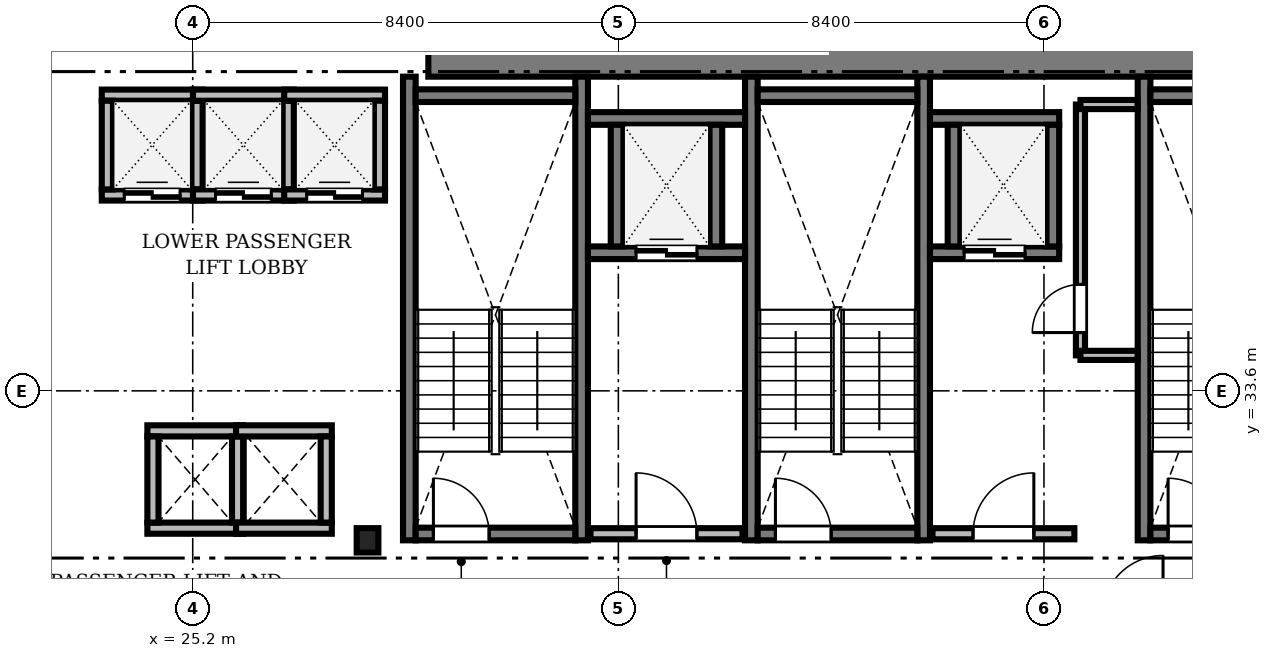
"""IFC4 building model, lengths in metres.
Left out: names, types, materials, properties, quantities, classifications, styles, units other than length and angle.
Written with IfcOpenShell. Run it as: python <this file> out.ifc"""

import sys

from ifc_helpers import new_model, si_unit, direction, frame, frame_2d, origin, origin_2d, place, context, subcontext, project, spatial, rectangle, i_section, extrude, source, transform, mapped, element, fill, save


model = new_model("IFC4")
c1 = context("Model", 3, precision=1e-05, world=origin(), true_north=direction((0.0, 1.0)))
c2 = subcontext(c1, "Body", "Model", "MODEL_VIEW")
j1 = project(units=[si_unit("LENGTHUNIT", "METRE"), si_unit("PLANEANGLEUNIT", "RADIAN")], contexts=[c1])
p1 = place(None, origin())
s1 = spatial("IfcSite", under=j1, at=p1, CompositionType="ELEMENT")
p2 = place(p1, origin())
s2 = spatial("IfcBuilding", under=s1, at=p2, CompositionType="ELEMENT")
p3 = place(p2, frame((0.0, 0.0, 53.15)))
s3 = spatial("IfcBuildingStorey", under=s2, at=p3, CompositionType="ELEMENT", Elevation=53.15)
m1 = source(origin(), c2, "Body", "SweptSolid", [
    extrude(rectangle(XDim=17.52, YDim=1.0, at=frame_2d((8.76, 0.0))), origin(), (0.0, 0.0, 1.0), 3.41),
])
p4 = place(p3, frame((29.85, 40.3, 0.0), z_axis=(0.0, 0.0, 1.0), x_axis=(1.0, 0.0, 0.0)))
e1 = element("IfcWall", 1, at=p4, inside=s3, PredefinedType="SHEAR", context=c2, shape_type="MappedRepresentation", body=[
    mapped(m1, transform((0.0, 0.0, 0.0), scale=1.0)),
])
m2 = source(origin(), c2, "Body", "SweptSolid", [
    extrude(i_section(OverallWidth=0.428, OverallDepth=0.481, WebThickness=0.04, FlangeThickness=0.063, FilletRadius=0.015, at=origin_2d()), origin(), (0.0, 0.0, 1.0), 3.41),
])
p5 = place(p3, frame((28.65, 30.65, 0.0), z_axis=(0.0, 0.0, 1.0), x_axis=(1.0, 0.0, 0.0)))
e2 = element("IfcColumn", 2, at=p5, inside=s3, PredefinedType="COLUMN", context=c2, shape_type="MappedRepresentation", body=[
    mapped(m2, transform((0.0, 0.0, 0.0), scale=1.0)),
])
m3 = source(origin(), c2, "Body", "SweptSolid", [
    extrude(rectangle(XDim=9.15, YDim=0.25, at=frame_2d((4.575, 0.0))), origin(), (0.0, 0.0, 1.0), 3.45),
])
for number, where, z_axis, x_axis in (
    (3, (29.475, 30.65, 0.0), (0.0, 0.0, 1.0), (0.0, 1.0, 0.0)),
    (4, (32.875, 30.65, 0.0), (0.0, 0.0, 1.0), (0.0, 1.0, 0.0)),
):
    element("IfcWall", number, at=place(p3, frame(where, z_axis=z_axis, x_axis=x_axis)), inside=s3, PredefinedType="SOLIDWALL", context=c2, shape_type="MappedRepresentation", body=[
        mapped(m3, transform((0.0, 0.0, 0.0), scale=1.0)),
    ])
m4 = source(origin(), c2, "Body", "SweptSolid", [
    extrude(rectangle(XDim=3.15, YDim=0.25, at=frame_2d((1.575, 0.0))), origin(), (0.0, 0.0, 1.0), 3.45),
])
p6 = place(p3, frame((29.6, 39.425, 0.0), z_axis=(0.0, 0.0, 1.0), x_axis=(1.0, 0.0, 0.0)))
e5 = element("IfcWall", 5, at=p6, inside=s3, PredefinedType="SOLIDWALL", context=c2, shape_type="MappedRepresentation", body=[
    mapped(m4, transform((0.0, 0.0, 0.0), scale=1.0)),
])
p7 = place(p3, frame((29.6, 30.775, 0.0), z_axis=(0.0, 0.0, 1.0), x_axis=(1.0, 0.0, 0.0)))
e6 = element("IfcWall", 6, at=p7, inside=s3, PredefinedType="SOLIDWALL", context=c2, shape_type="MappedRepresentation", body=[
    mapped(m4, transform((0.0, 0.0, 0.0), scale=1.0)),
])
m5 = source(origin(), c2, "Body", "SweptSolid", [
    extrude(rectangle(XDim=1.1, YDim=2.2, at=frame_2d((0.55, 1.1))), frame((0.0, 0.135, 0.0), z_axis=(0.0, -1.0, 0.0), x_axis=(1.0, 0.0, 0.0)), (0.0, 0.0, 1.0), 0.27),
])
p8 = place(p7, frame((0.35, 0.0, 0.0)))
e7 = element("IfcOpeningElement", 7, at=p8, cuts=e6, PredefinedType="OPENING", context=c2, shape_type="MappedRepresentation", body=[
    mapped(m5, transform((0.0, 0.0, 0.0), scale=1.0)),
])
for number, where, z_axis, x_axis in (
    (8, (36.225, 30.65, 0.0), (0.0, 0.0, 1.0), (0.0, 1.0, 0.0)),
    (9, (39.625, 30.65, 0.0), (0.0, 0.0, 1.0), (0.0, 1.0, 0.0)),
):
    element("IfcWall", number, at=place(p3, frame(where, z_axis=z_axis, x_axis=x_axis)), inside=s3, PredefinedType="SOLIDWALL", context=c2, shape_type="MappedRepresentation", body=[
        mapped(m3, transform((0.0, 0.0, 0.0), scale=1.0)),
    ])
p9 = place(p3, frame((36.35, 39.425, 0.0), z_axis=(0.0, 0.0, 1.0), x_axis=(1.0, 0.0, 0.0)))
e10 = element("IfcWall", 10, at=p9, inside=s3, PredefinedType="SOLIDWALL", context=c2, shape_type="MappedRepresentation", body=[
    mapped(m4, transform((0.0, 0.0, 0.0), scale=1.0)),
])
p10 = place(p3, frame((36.35, 30.775, 0.0), z_axis=(0.0, 0.0, 1.0), x_axis=(1.0, 0.0, 0.0)))
e11 = element("IfcWall", 11, at=p10, inside=s3, PredefinedType="SOLIDWALL", context=c2, shape_type="MappedRepresentation", body=[
    mapped(m4, transform((0.0, 0.0, 0.0), scale=1.0)),
])
p11 = place(p10, frame((0.35, 0.0, 0.0)))
e12 = element("IfcOpeningElement", 12, at=p11, cuts=e11, PredefinedType="OPENING", context=c2, shape_type="MappedRepresentation", body=[
    mapped(m5, transform((0.0, 0.0, 0.0), scale=1.0)),
])
p12 = place(p3, frame((43.975, 30.65, 0.0), z_axis=(0.0, 0.0, 1.0), x_axis=(0.0, 1.0, 0.0)))
e13 = element("IfcWall", 13, at=p12, inside=s3, PredefinedType="SOLIDWALL", context=c2, shape_type="MappedRepresentation", body=[
    mapped(m3, transform((0.0, 0.0, 0.0), scale=1.0)),
])
p13 = place(p3, frame((44.1, 39.425, 0.0), z_axis=(0.0, 0.0, 1.0), x_axis=(1.0, 0.0, 0.0)))
e14 = element("IfcWall", 14, at=p13, inside=s3, PredefinedType="SOLIDWALL", context=c2, shape_type="MappedRepresentation", body=[
    mapped(m4, transform((0.0, 0.0, 0.0), scale=1.0)),
])
p14 = place(p3, frame((44.1, 30.775, 0.0), z_axis=(0.0, 0.0, 1.0), x_axis=(1.0, 0.0, 0.0)))
e15 = element("IfcWall", 15, at=p14, inside=s3, PredefinedType="SOLIDWALL", context=c2, shape_type="MappedRepresentation", body=[
    mapped(m4, transform((0.0, 0.0, 0.0), scale=1.0)),
])
p15 = place(p14, frame((0.35, 0.0, 0.0)))
e16 = element("IfcOpeningElement", 16, at=p15, cuts=e15, PredefinedType="OPENING", context=c2, shape_type="MappedRepresentation", body=[
    mapped(m5, transform((0.0, 0.0, 0.0), scale=1.0)),
])
m6 = source(origin(), c2, "Body", "SweptSolid", [
    extrude(rectangle(XDim=3.0, YDim=0.22, at=frame_2d((1.5, 0.0))), origin(), (0.0, 0.0, 1.0), 3.41),
])
p16 = place(p3, frame((33.05, 30.78, 0.0), z_axis=(0.0, 0.0, 1.0), x_axis=(1.0, 0.0, 0.0)))
e17 = element("IfcWall", 17, at=p16, inside=s3, PredefinedType="SOLIDWALL", context=c2, shape_type="MappedRepresentation", body=[
    mapped(m6, transform((0.0, 0.0, 0.0), scale=1.0)),
])
m7 = source(origin(), c2, "Body", "SweptSolid", [
    extrude(rectangle(XDim=1.2, YDim=2.2, at=frame_2d((0.6, 1.1))), frame((0.0, 0.12, 0.0), z_axis=(0.0, -1.0, 0.0), x_axis=(1.0, 0.0, 0.0)), (0.0, 0.0, 1.0), 0.24),
])
p17 = place(p16, frame((0.9, 0.0, 0.0)))
e18 = element("IfcOpeningElement", 18, at=p17, cuts=e17, PredefinedType="OPENING", context=c2, shape_type="MappedRepresentation", body=[
    mapped(m7, transform((0.0, 0.0, 0.0), scale=1.0)),
])
m8 = source(origin(), c2, "Body", "SweptSolid", [
    extrude(rectangle(XDim=2.8, YDim=0.22, at=frame_2d((1.4, 0.0))), origin(), (0.0, 0.0, 1.0), 3.41),
])
p18 = place(p3, frame((39.8, 30.78, 0.0), z_axis=(0.0, 0.0, 1.0), x_axis=(1.0, 0.0, 0.0)))
e19 = element("IfcWall", 19, at=p18, inside=s3, PredefinedType="SOLIDWALL", context=c2, shape_type="MappedRepresentation", body=[
    mapped(m8, transform((0.0, 0.0, 0.0), scale=1.0)),
])
p19 = place(p18, frame((0.8, 0.0, 0.0)))
e20 = element("IfcOpeningElement", 20, at=p19, cuts=e19, PredefinedType="OPENING", context=c2, shape_type="MappedRepresentation", body=[
    mapped(m7, transform((0.0, 0.0, 0.0), scale=1.0)),
])
m9 = source(origin(), c2, "Body", "SweptSolid", [
    extrude(rectangle(XDim=1.99, YDim=0.22, at=frame_2d((0.995, 0.0))), origin(), (0.0, 0.0, 1.0), 3.41),
])
p20 = place(p3, frame((23.405, 37.465, 0.0), z_axis=(0.0, 0.0, 1.0), x_axis=(1.0, 0.0, 0.0)))
e21 = element("IfcWall", 21, at=p20, inside=s3, PredefinedType="SOLIDWALL", context=c2, shape_type="MappedRepresentation", body=[
    mapped(m9, transform((0.0, 0.0, 0.0), scale=1.0)),
])
m10 = source(origin(), c2, "Body", "SweptSolid", [
    extrude(rectangle(XDim=1.1, YDim=2.2, at=frame_2d((0.55, 1.1))), frame((0.0, 0.12, 0.0), z_axis=(0.0, -1.0, 0.0), x_axis=(1.0, 0.0, 0.0)), (0.0, 0.0, 1.0), 0.24),
])
p21 = place(p20, frame((0.445, 0.0, 0.0)))
e22 = element("IfcOpeningElement", 22, at=p21, cuts=e21, PredefinedType="OPENING", context=c2, shape_type="MappedRepresentation", body=[
    mapped(m10, transform((0.0, 0.0, 0.0), scale=1.0)),
])
p22 = place(p3, frame((23.405, 39.435, 0.0), z_axis=(0.0, 0.0, 1.0), x_axis=(1.0, 0.0, 0.0)))
e23 = element("IfcWall", 23, at=p22, inside=s3, PredefinedType="SOLIDWALL", context=c2, shape_type="MappedRepresentation", body=[
    mapped(m9, transform((0.0, 0.0, 0.0), scale=1.0)),
])
m11 = source(origin(), c2, "Body", "SweptSolid", [
    extrude(rectangle(XDim=1.75, YDim=0.22, at=frame_2d((0.875, 0.0))), origin(), (0.0, 0.0, 1.0), 3.41),
])
for number, where, z_axis, x_axis in (
    (24, (23.515, 37.575, 0.0), (0.0, 0.0, 1.0), (0.0, 1.0, 0.0)),
    (25, (25.285, 37.575, 0.0), (0.0, 0.0, 1.0), (0.0, 1.0, 0.0)),
):
    element("IfcWall", number, at=place(p3, frame(where, z_axis=z_axis, x_axis=x_axis)), inside=s3, PredefinedType="SOLIDWALL", context=c2, shape_type="MappedRepresentation", body=[
        mapped(m11, transform((0.0, 0.0, 0.0), scale=1.0)),
    ])
p23 = place(p3, frame((25.205, 37.465, 0.0), z_axis=(0.0, 0.0, 1.0), x_axis=(1.0, 0.0, 0.0)))
e26 = element("IfcWall", 26, at=p23, inside=s3, PredefinedType="SOLIDWALL", context=c2, shape_type="MappedRepresentation", body=[
    mapped(m9, transform((0.0, 0.0, 0.0), scale=1.0)),
])
p24 = place(p23, frame((0.445, 0.0, 0.0)))
e27 = element("IfcOpeningElement", 27, at=p24, cuts=e26, PredefinedType="OPENING", context=c2, shape_type="MappedRepresentation", body=[
    mapped(m10, transform((0.0, 0.0, 0.0), scale=1.0)),
])
p25 = place(p3, frame((25.205, 39.435, 0.0), z_axis=(0.0, 0.0, 1.0), x_axis=(1.0, 0.0, 0.0)))
e28 = element("IfcWall", 28, at=p25, inside=s3, PredefinedType="SOLIDWALL", context=c2, shape_type="MappedRepresentation", body=[
    mapped(m9, transform((0.0, 0.0, 0.0), scale=1.0)),
])
p26 = place(p3, frame((27.085, 37.575, 0.0), z_axis=(0.0, 0.0, 1.0), x_axis=(0.0, 1.0, 0.0)))
e29 = element("IfcWall", 29, at=p26, inside=s3, PredefinedType="SOLIDWALL", context=c2, shape_type="MappedRepresentation", body=[
    mapped(m11, transform((0.0, 0.0, 0.0), scale=1.0)),
])
m12 = source(origin(), c2, "Body", "SweptSolid", [
    extrude(rectangle(XDim=1.99, YDim=0.22, at=frame_2d((0.995, 0.0))), origin(), (0.0, 0.0, 1.0), 3.41),
])
p27 = place(p3, frame((27.005, 37.465, 0.0), z_axis=(0.0, 0.0, 1.0), x_axis=(1.0, 0.0, 0.0)))
e30 = element("IfcWall", 30, at=p27, inside=s3, PredefinedType="SOLIDWALL", context=c2, shape_type="MappedRepresentation", body=[
    mapped(m12, transform((0.0, 0.0, 0.0), scale=1.0)),
])
p28 = place(p27, frame((0.445, 0.0, 0.0)))
e31 = element("IfcOpeningElement", 31, at=p28, cuts=e30, PredefinedType="OPENING", context=c2, shape_type="MappedRepresentation", body=[
    mapped(m10, transform((0.0, 0.0, 0.0), scale=1.0)),
])
p29 = place(p3, frame((27.005, 39.435, 0.0), z_axis=(0.0, 0.0, 1.0), x_axis=(1.0, 0.0, 0.0)))
e32 = element("IfcWall", 32, at=p29, inside=s3, PredefinedType="SOLIDWALL", context=c2, shape_type="MappedRepresentation", body=[
    mapped(m12, transform((0.0, 0.0, 0.0), scale=1.0)),
])
p30 = place(p3, frame((28.885, 37.575, 0.0), z_axis=(0.0, 0.0, 1.0), x_axis=(0.0, 1.0, 0.0)))
e33 = element("IfcWall", 33, at=p30, inside=s3, PredefinedType="SOLIDWALL", context=c2, shape_type="MappedRepresentation", body=[
    mapped(m11, transform((0.0, 0.0, 0.0), scale=1.0)),
])
m13 = source(origin(), c2, "Body", "SweptSolid", [
    extrude(rectangle(XDim=3.1, YDim=0.25, at=frame_2d((1.55, 0.0))), origin(), (0.0, 0.0, 1.0), 3.41),
])
p31 = place(p3, frame((33.0, 36.325, 0.0), z_axis=(0.0, 0.0, 1.0), x_axis=(1.0, 0.0, 0.0)))
e34 = element("IfcWall", 34, at=p31, inside=s3, PredefinedType="SOLIDWALL", context=c2, shape_type="MappedRepresentation", body=[
    mapped(m13, transform((0.0, 0.0, 0.0), scale=1.0)),
])
m14 = source(origin(), c2, "Body", "SweptSolid", [
    extrude(rectangle(XDim=1.2, YDim=2.25, at=frame_2d((0.6, 1.125))), frame((0.0, 0.135, 0.0), z_axis=(0.0, -1.0, 0.0), x_axis=(1.0, 0.0, 0.0)), (0.0, 0.0, 1.0), 0.27),
])
p32 = place(p31, frame((0.95, 0.0, 0.0)))
e35 = element("IfcOpeningElement", 35, at=p32, cuts=e34, PredefinedType="OPENING", context=c2, shape_type="MappedRepresentation", body=[
    mapped(m14, transform((0.0, 0.0, 0.0), scale=1.0)),
])
p33 = place(p3, frame((33.0, 38.975, 0.0), z_axis=(0.0, 0.0, 1.0), x_axis=(1.0, 0.0, 0.0)))
e36 = element("IfcWall", 36, at=p33, inside=s3, PredefinedType="SOLIDWALL", context=c2, shape_type="MappedRepresentation", body=[
    mapped(m13, transform((0.0, 0.0, 0.0), scale=1.0)),
])
m15 = source(origin(), c2, "Body", "SweptSolid", [
    extrude(rectangle(XDim=2.4, YDim=0.25, at=frame_2d((1.2, 0.0))), origin(), (0.0, 0.0, 1.0), 3.41),
])
for number, where, z_axis, x_axis in (
    (37, (33.575, 36.45, 0.0), (0.0, 0.0, 1.0), (0.0, 1.0, 0.0)),
    (38, (35.525, 36.45, 0.0), (0.0, 0.0, 1.0), (0.0, 1.0, 0.0)),
):
    element("IfcWall", number, at=place(p3, frame(where, z_axis=z_axis, x_axis=x_axis)), inside=s3, PredefinedType="SOLIDWALL", context=c2, shape_type="MappedRepresentation", body=[
        mapped(m15, transform((0.0, 0.0, 0.0), scale=1.0)),
    ])
m16 = source(origin(), c2, "Body", "SweptSolid", [
    extrude(rectangle(XDim=2.55, YDim=0.25, at=frame_2d((1.275, 0.0))), origin(), (0.0, 0.0, 1.0), 3.41),
])
p34 = place(p3, frame((39.75, 36.325, 0.0), z_axis=(0.0, 0.0, 1.0), x_axis=(1.0, 0.0, 0.0)))
e39 = element("IfcWall", 39, at=p34, inside=s3, PredefinedType="SOLIDWALL", context=c2, shape_type="MappedRepresentation", body=[
    mapped(m16, transform((0.0, 0.0, 0.0), scale=1.0)),
])
p35 = place(p34, frame((0.675, 0.0, 0.0)))
e40 = element("IfcOpeningElement", 40, at=p35, cuts=e39, PredefinedType="OPENING", context=c2, shape_type="MappedRepresentation", body=[
    mapped(m14, transform((0.0, 0.0, 0.0), scale=1.0)),
])
p36 = place(p3, frame((39.75, 38.975, 0.0), z_axis=(0.0, 0.0, 1.0), x_axis=(1.0, 0.0, 0.0)))
e41 = element("IfcWall", 41, at=p36, inside=s3, PredefinedType="SOLIDWALL", context=c2, shape_type="MappedRepresentation", body=[
    mapped(m16, transform((0.0, 0.0, 0.0), scale=1.0)),
])
for number, where, z_axis, x_axis in (
    (42, (40.225, 36.45, 0.0), (0.0, 0.0, 1.0), (0.0, 1.0, 0.0)),
    (43, (42.175, 36.45, 0.0), (0.0, 0.0, 1.0), (0.0, 1.0, 0.0)),
):
    element("IfcWall", number, at=place(p3, frame(where, z_axis=z_axis, x_axis=x_axis)), inside=s3, PredefinedType="SOLIDWALL", context=c2, shape_type="MappedRepresentation", body=[
        mapped(m15, transform((0.0, 0.0, 0.0), scale=1.0)),
    ])
m17 = source(origin(), c2, "Body", "SweptSolid", [
    extrude(rectangle(XDim=1.89, YDim=0.22, at=frame_2d((0.945, 0.0))), origin(), (0.0, 0.0, 1.0), 3.41),
])
for number, where, z_axis, x_axis in (
    (44, (24.305, 30.89, 0.0), (0.0, 0.0, 1.0), (1.0, 0.0, 0.0)),
    (45, (24.305, 32.81, 0.0), (0.0, 0.0, 1.0), (1.0, 0.0, 0.0)),
):
    element("IfcWall", number, at=place(p3, frame(where, z_axis=z_axis, x_axis=x_axis)), inside=s3, PredefinedType="SOLIDWALL", context=c2, shape_type="MappedRepresentation", body=[
        mapped(m17, transform((0.0, 0.0, 0.0), scale=1.0)),
    ])
m18 = source(origin(), c2, "Body", "SweptSolid", [
    extrude(rectangle(XDim=1.7, YDim=0.22, at=frame_2d((0.85, 0.0))), origin(), (0.0, 0.0, 1.0), 3.41),
])
for number, where, z_axis, x_axis in (
    (46, (24.415, 31.0, 0.0), (0.0, 0.0, 1.0), (0.0, 1.0, 0.0)),
    (47, (26.085, 31.0, 0.0), (0.0, 0.0, 1.0), (0.0, 1.0, 0.0)),
):
    element("IfcWall", number, at=place(p3, frame(where, z_axis=z_axis, x_axis=x_axis)), inside=s3, PredefinedType="SOLIDWALL", context=c2, shape_type="MappedRepresentation", body=[
        mapped(m18, transform((0.0, 0.0, 0.0), scale=1.0)),
    ])
for number, where, z_axis, x_axis in (
    (48, (26.055, 30.89, 0.0), (0.0, 0.0, 1.0), (1.0, 0.0, 0.0)),
    (49, (26.055, 32.81, 0.0), (0.0, 0.0, 1.0), (1.0, 0.0, 0.0)),
):
    element("IfcWall", number, at=place(p3, frame(where, z_axis=z_axis, x_axis=x_axis)), inside=s3, PredefinedType="SOLIDWALL", context=c2, shape_type="MappedRepresentation", body=[
        mapped(m17, transform((0.0, 0.0, 0.0), scale=1.0)),
    ])
p37 = place(p3, frame((27.835, 31.0, 0.0), z_axis=(0.0, 0.0, 1.0), x_axis=(0.0, 1.0, 0.0)))
e50 = element("IfcWall", 50, at=p37, inside=s3, PredefinedType="SOLIDWALL", context=c2, shape_type="MappedRepresentation", body=[
    mapped(m18, transform((0.0, 0.0, 0.0), scale=1.0)),
])
m19 = source(origin(), c2, "Body", "SweptSolid", [
    extrude(rectangle(XDim=4.95, YDim=0.18, at=frame_2d((2.475, 0.0))), origin(), (0.0, 0.0, 1.0), 3.41),
])
p38 = place(p3, frame((42.72, 34.3, 0.0), z_axis=(0.0, 0.0, 1.0), x_axis=(0.0, 1.0, 0.0)))
e51 = element("IfcWall", 51, at=p38, inside=s3, PredefinedType="PARTITIONING", context=c2, shape_type="MappedRepresentation", body=[
    mapped(m19, transform((0.0, 0.0, 0.0), scale=1.0)),
])
m20 = source(origin(), c2, "Body", "SweptSolid", [
    extrude(rectangle(XDim=0.95, YDim=2.15, at=frame_2d((0.475, 1.075))), frame((0.0, 0.1, 0.0), z_axis=(0.0, -1.0, 0.0), x_axis=(1.0, 0.0, 0.0)), (0.0, 0.0, 1.0), 0.2),
])
p39 = place(p38, frame((0.45, 0.0, 0.0)))
e52 = element("IfcOpeningElement", 52, at=p39, cuts=e51, PredefinedType="OPENING", context=c2, shape_type="MappedRepresentation", body=[
    mapped(m20, transform((0.0, 0.0, 0.0), scale=1.0)),
])
m21 = source(origin(), c2, "Body", "SweptSolid", [
    extrude(rectangle(XDim=1.128, YDim=0.18, at=frame_2d((0.564, 0.0))), origin(), (0.0, 0.0, 1.0), 3.41),
])
for number, where, z_axis, x_axis in (
    (53, (42.72, 34.3, 0.0), (0.0, 0.0, 1.0), (1.0, 0.0, 0.0)),
    (54, (42.72, 39.25, 0.0), (0.0, 0.0, 1.0), (1.0, 0.0, 0.0)),
):
    element("IfcWall", number, at=place(p3, frame(where, z_axis=z_axis, x_axis=x_axis)), inside=s3, PredefinedType="PARTITIONING", context=c2, shape_type="MappedRepresentation", body=[
        mapped(m21, transform((0.0, 0.0, 0.0), scale=1.0)),
    ])
m22 = source(origin(), c2, "Body", "SweptSolid", [
    extrude(rectangle(XDim=1.1, YDim=2.2, at=frame_2d((0.55, 1.1))), frame((0.0, 0.025, 0.0), z_axis=(0.0, -1.0, 0.0), x_axis=(1.0, 0.0, 0.0)), (0.0, 0.0, 1.0), 0.05),
])
p40 = place(p8, origin())
e55 = element("IfcDoor", 55, at=p40, inside=s3, OperationType="SINGLE_SWING_LEFT", PredefinedType="DOOR", context=c2, shape_type="MappedRepresentation", body=[
    mapped(m22, transform((0.0, 0.0, 0.0), scale=1.0)),
])
fill(e7, e55)
p41 = place(p11, origin())
e56 = element("IfcDoor", 56, at=p41, inside=s3, OperationType="SINGLE_SWING_LEFT", PredefinedType="DOOR", context=c2, shape_type="MappedRepresentation", body=[
    mapped(m22, transform((0.0, 0.0, 0.0), scale=1.0)),
])
fill(e12, e56)
p42 = place(p15, origin())
e57 = element("IfcDoor", 57, at=p42, inside=s3, OperationType="SINGLE_SWING_LEFT", PredefinedType="DOOR", context=c2, shape_type="MappedRepresentation", body=[
    mapped(m22, transform((0.0, 0.0, 0.0), scale=1.0)),
])
fill(e16, e57)
m23 = source(origin(), c2, "Body", "SweptSolid", [
    extrude(rectangle(XDim=1.2, YDim=2.2, at=frame_2d((0.6, 1.1))), frame((0.0, 0.025, 0.0), z_axis=(0.0, -1.0, 0.0), x_axis=(1.0, 0.0, 0.0)), (0.0, 0.0, 1.0), 0.05),
])
p43 = place(p17, origin())
e58 = element("IfcDoor", 58, at=p43, inside=s3, OperationType="SINGLE_SWING_LEFT", PredefinedType="DOOR", context=c2, shape_type="MappedRepresentation", body=[
    mapped(m23, transform((0.0, 0.0, 0.0), scale=1.0)),
])
fill(e18, e58)
p44 = place(p19, origin())
e59 = element("IfcDoor", 59, at=p44, inside=s3, OperationType="SINGLE_SWING_RIGHT", PredefinedType="DOOR", context=c2, shape_type="MappedRepresentation", body=[
    mapped(m23, transform((0.0, 0.0, 0.0), scale=1.0)),
])
fill(e20, e59)
p45 = place(p21, origin())
e60 = element("IfcDoor", 60, at=p45, inside=s3, OperationType="DOUBLE_DOOR_SLIDING", PredefinedType="DOOR", context=c2, shape_type="MappedRepresentation", body=[
    mapped(m22, transform((0.0, 0.0, 0.0), scale=1.0)),
])
fill(e22, e60)
p46 = place(p24, origin())
e61 = element("IfcDoor", 61, at=p46, inside=s3, OperationType="DOUBLE_DOOR_SLIDING", PredefinedType="DOOR", context=c2, shape_type="MappedRepresentation", body=[
    mapped(m22, transform((0.0, 0.0, 0.0), scale=1.0)),
])
fill(e27, e61)
p47 = place(p28, origin())
e62 = element("IfcDoor", 62, at=p47, inside=s3, OperationType="DOUBLE_DOOR_SLIDING", PredefinedType="DOOR", context=c2, shape_type="MappedRepresentation", body=[
    mapped(m22, transform((0.0, 0.0, 0.0), scale=1.0)),
])
fill(e31, e62)
m24 = source(origin(), c2, "Body", "SweptSolid", [
    extrude(rectangle(XDim=1.2, YDim=2.25, at=frame_2d((0.6, 1.125))), frame((0.0, 0.025, 0.0), z_axis=(0.0, -1.0, 0.0), x_axis=(1.0, 0.0, 0.0)), (0.0, 0.0, 1.0), 0.05),
])
p48 = place(p32, origin())
e63 = element("IfcDoor", 63, at=p48, inside=s3, OperationType="DOUBLE_DOOR_SLIDING", PredefinedType="DOOR", context=c2, shape_type="MappedRepresentation", body=[
    mapped(m24, transform((0.0, 0.0, 0.0), scale=1.0)),
])
fill(e35, e63)
p49 = place(p35, origin())
e64 = element("IfcDoor", 64, at=p49, inside=s3, OperationType="DOUBLE_DOOR_SLIDING", PredefinedType="DOOR", context=c2, shape_type="MappedRepresentation", body=[
    mapped(m24, transform((0.0, 0.0, 0.0), scale=1.0)),
])
fill(e40, e64)
m25 = source(origin(), c2, "Body", "SweptSolid", [
    extrude(rectangle(XDim=0.95, YDim=2.15, at=frame_2d((0.475, 1.075))), frame((0.0, 0.025, 0.0), z_axis=(0.0, -1.0, 0.0), x_axis=(1.0, 0.0, 0.0)), (0.0, 0.0, 1.0), 0.05),
])
p50 = place(p39, origin())
e65 = element("IfcDoor", 65, at=p50, inside=s3, OperationType="SINGLE_SWING_LEFT", PredefinedType="DOOR", context=c2, shape_type="MappedRepresentation", body=[
    mapped(m25, transform((0.0, 0.0, 0.0), scale=1.0)),
])
fill(e52, e65)
save(model, sys.argv[1])
